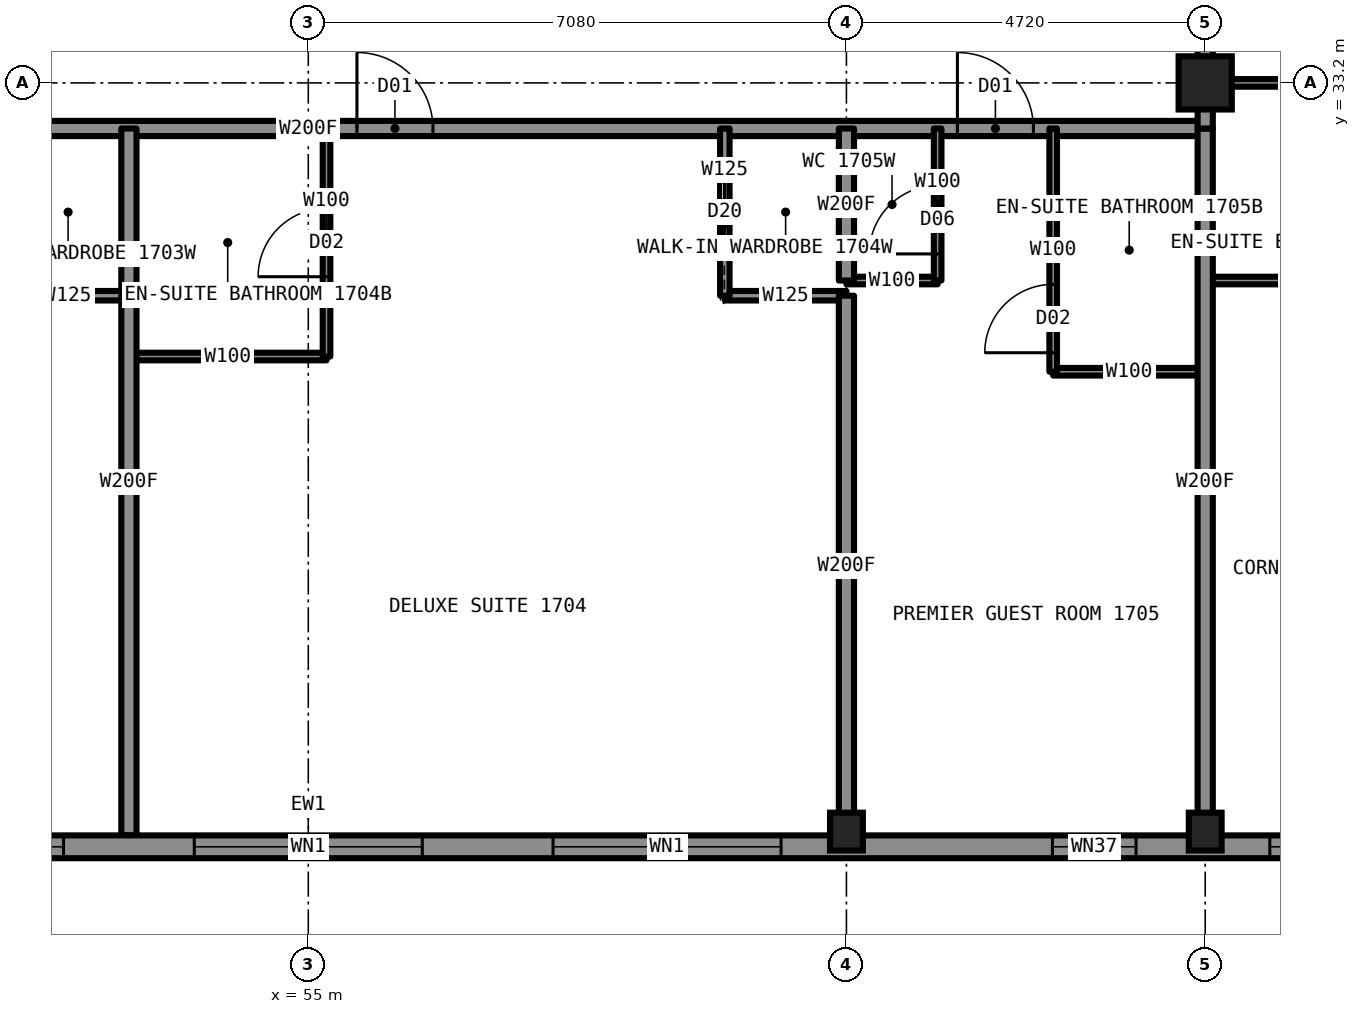
"""IFC4 building model, lengths in metres.
Left out: names, types, materials, properties, quantities, classifications, styles, units other than length and angle.
Written with IfcOpenShell. Run it as: python <this file> out.ifc"""

import sys

from ifc_helpers import new_model, si_unit, direction, frame, frame_2d, origin, origin_2d, place, context, subcontext, project, spatial, rectangle, hollow_rectangle, i_section, extrude, element, fill, save


model = new_model("IFC4")
c1 = context("Model", 3, precision=1e-05, world=origin(), true_north=direction((0.0, 1.0)))
c2 = subcontext(c1, "Body", "Model", "MODEL_VIEW")
j1 = project(units=[si_unit("LENGTHUNIT", "METRE"), si_unit("PLANEANGLEUNIT", "RADIAN")], contexts=[c1])
p1 = place(None, origin())
s1 = spatial("IfcSite", under=j1, at=p1, CompositionType="ELEMENT")
p2 = place(p1, origin())
s2 = spatial("IfcBuilding", under=s1, at=p2, CompositionType="ELEMENT")
p3 = place(p2, frame((0.0, 0.0, 60.0)))
s3 = spatial("IfcBuildingStorey", under=s2, at=p3, CompositionType="ELEMENT", Elevation=60.0)
for number, where, z_axis, x_axis in (
    (1, (62.08, 23.35, 0.0), (0.0, 0.0, 1.0), (1.0, 0.0, 0.0)),
    (2, (66.8, 23.35, 0.0), (0.0, 0.0, 1.0), (1.0, 0.0, 0.0)),
):
    element("IfcColumn", number, at=place(p3, frame(where, z_axis=z_axis, x_axis=x_axis)), inside=s3, PredefinedType="COLUMN", context=c2, shape_type="SweptSolid", body=[
        extrude(i_section(OverallWidth=0.432, OverallDepth=0.498, WebThickness=0.056, FlangeThickness=0.089, at=origin_2d()), origin(), (0.0, 0.0, 1.0), 3.5),
    ])
p4 = place(p3, frame((66.8, 33.2, 0.0), z_axis=(0.0, 0.0, 1.0), x_axis=(1.0, 0.0, 0.0)))
e3 = element("IfcColumn", 3, at=p4, inside=s3, PredefinedType="COLUMN", context=c2, shape_type="SweptSolid", body=[
    extrude(hollow_rectangle(XDim=0.7, YDim=0.7, WallThickness=0.06, at=origin_2d()), origin(), (0.0, 0.0, 1.0), 3.5),
])
p5 = place(p3, frame((66.8, 33.2, 0.0), z_axis=(0.0, 0.0, 1.0), x_axis=(1.0, 0.0, 0.0)))
e4 = element("IfcWall", 4, at=p5, inside=s3, PredefinedType="PARTITIONING", context=c2, shape_type="SweptSolid", body=[
    extrude(rectangle(XDim=2.6, YDim=0.1, at=frame_2d((1.3, 0.0))), origin(), (0.0, 0.0, 1.0), 2.573),
])
p6 = place(p3, frame((43.2, 32.6, 0.0), z_axis=(0.0, 0.0, 1.0), x_axis=(1.0, 0.0, 0.0)))
e5 = element("IfcWall", 5, at=p6, inside=s3, PredefinedType="PARTITIONING", context=c2, shape_type="SweptSolid", body=[
    extrude(rectangle(XDim=23.6, YDim=0.2, at=frame_2d((11.8, 0.0))), origin(), (0.0, 0.0, 1.0), 3.33),
])
p7 = place(p6, frame((3.0, 0.0, 0.0)))
e6 = element("IfcOpeningElement", 6, at=p7, cuts=e5, PredefinedType="OPENING", context=c2, shape_type="SweptSolid", body=[
    extrude(rectangle(XDim=1.0, YDim=2.2, at=frame_2d((0.5, 1.1))), frame((0.0, 0.11, 0.0), z_axis=(0.0, -1.0, 0.0), x_axis=(1.0, 0.0, 0.0)), (0.0, 0.0, 1.0), 0.22),
])
p8 = place(p6, frame((12.44, 0.0, 0.0)))
e7 = element("IfcOpeningElement", 7, at=p8, cuts=e5, PredefinedType="OPENING", context=c2, shape_type="SweptSolid", body=[
    extrude(rectangle(XDim=1.0, YDim=2.2, at=frame_2d((0.5, 1.1))), frame((0.0, 0.11, 0.0), z_axis=(0.0, -1.0, 0.0), x_axis=(1.0, 0.0, 0.0)), (0.0, 0.0, 1.0), 0.22),
])
p9 = place(p6, frame((20.34, 0.0, 0.0)))
e8 = element("IfcOpeningElement", 8, at=p9, cuts=e5, PredefinedType="OPENING", context=c2, shape_type="SweptSolid", body=[
    extrude(rectangle(XDim=1.0, YDim=2.2, at=frame_2d((0.5, 1.1))), frame((0.0, 0.11, 0.0), z_axis=(0.0, -1.0, 0.0), x_axis=(1.0, 0.0, 0.0)), (0.0, 0.0, 1.0), 0.22),
])
p10 = place(p3, frame((62.08, 30.6, 0.0), z_axis=(0.0, 0.0, 1.0), x_axis=(1.0, 0.0, 0.0)))
e9 = element("IfcWall", 9, at=p10, inside=s3, PredefinedType="PARTITIONING", context=c2, shape_type="SweptSolid", body=[
    extrude(rectangle(XDim=1.2, YDim=0.1, at=frame_2d((0.6, 0.0))), origin(), (0.0, 0.0, 1.0), 3.33),
])
p11 = place(p3, frame((66.8, 30.6, 0.0), z_axis=(0.0, 0.0, 1.0), x_axis=(1.0, 0.0, 0.0)))
e10 = element("IfcWall", 10, at=p11, inside=s3, PredefinedType="PARTITIONING", context=c2, shape_type="SweptSolid", body=[
    extrude(rectangle(XDim=2.6, YDim=0.1, at=frame_2d((1.3, 0.0))), origin(), (0.0, 0.0, 1.0), 3.33),
])
p12 = place(p3, frame((51.04, 30.4, 0.0), z_axis=(0.0, 0.0, 1.0), x_axis=(1.0, 0.0, 0.0)))
e11 = element("IfcWall", 11, at=p12, inside=s3, PredefinedType="PARTITIONING", context=c2, shape_type="SweptSolid", body=[
    extrude(rectangle(XDim=1.6, YDim=0.125, at=frame_2d((0.8, 0.0))), origin(), (0.0, 0.0, 1.0), 3.33),
])
p13 = place(p3, frame((60.48, 30.4, 0.0), z_axis=(0.0, 0.0, 1.0), x_axis=(1.0, 0.0, 0.0)))
e12 = element("IfcWall", 12, at=p13, inside=s3, PredefinedType="PARTITIONING", context=c2, shape_type="SweptSolid", body=[
    extrude(rectangle(XDim=1.6, YDim=0.125, at=frame_2d((0.8, 0.0))), origin(), (0.0, 0.0, 1.0), 3.33),
])
p14 = place(p3, frame((52.64, 29.6, 0.0), z_axis=(0.0, 0.0, 1.0), x_axis=(1.0, 0.0, 0.0)))
e13 = element("IfcWall", 13, at=p14, inside=s3, PredefinedType="PARTITIONING", context=c2, shape_type="SweptSolid", body=[
    extrude(rectangle(XDim=2.6, YDim=0.1, at=frame_2d((1.3, 0.0))), origin(), (0.0, 0.0, 1.0), 3.33),
])
p15 = place(p3, frame((64.8, 29.4, 0.0), z_axis=(0.0, 0.0, 1.0), x_axis=(1.0, 0.0, 0.0)))
e14 = element("IfcWall", 14, at=p15, inside=s3, PredefinedType="PARTITIONING", context=c2, shape_type="SweptSolid", body=[
    extrude(rectangle(XDim=2.0, YDim=0.1, at=frame_2d((1.0, 0.0))), origin(), (0.0, 0.0, 1.0), 3.33),
])
p16 = place(p3, frame((52.64, 23.3, 0.0), z_axis=(0.0, 0.0, 1.0), x_axis=(0.0, 1.0, 0.0)))
e15 = element("IfcWall", 15, at=p16, inside=s3, PredefinedType="PARTITIONING", context=c2, shape_type="SweptSolid", body=[
    extrude(rectangle(XDim=9.3, YDim=0.2, at=frame_2d((4.65, 0.0))), origin(), (0.0, 0.0, 1.0), 3.33),
])
p17 = place(p3, frame((55.24, 29.6, 0.0), z_axis=(0.0, 0.0, 1.0), x_axis=(0.0, 1.0, 0.0)))
e16 = element("IfcWall", 16, at=p17, inside=s3, PredefinedType="PARTITIONING", context=c2, shape_type="SweptSolid", body=[
    extrude(rectangle(XDim=3.0, YDim=0.1, at=frame_2d((1.5, 0.0))), origin(), (0.0, 0.0, 1.0), 3.33),
])
p18 = place(p17, frame((1.05, 0.0, 0.0)))
e17 = element("IfcOpeningElement", 17, at=p18, cuts=e16, PredefinedType="OPENING", context=c2, shape_type="SweptSolid", body=[
    extrude(rectangle(XDim=0.9, YDim=2.1, at=frame_2d((0.45, 1.05))), frame((0.0, 0.06, 0.0), z_axis=(0.0, -1.0, 0.0), x_axis=(1.0, 0.0, 0.0)), (0.0, 0.0, 1.0), 0.12),
])
p19 = place(p3, frame((66.8, 33.22, 0.0), z_axis=(0.0, 0.0, 1.0), x_axis=(0.0, 1.0, 0.0)))
e18 = element("IfcWall", 18, at=p19, inside=s3, PredefinedType="PARTITIONING", context=c2, shape_type="SweptSolid", body=[
    extrude(rectangle(XDim=23.58, YDim=0.2, at=frame_2d((11.79, 0.0))), origin(), (0.0, 0.0, 1.0), 3.33),
])
p20 = place(p19, frame((7.7, 0.0, 0.0)))
e19 = element("IfcOpeningElement", 19, at=p20, cuts=e18, PredefinedType="OPENING", context=c2, shape_type="SweptSolid", body=[
    extrude(rectangle(XDim=1.0, YDim=2.2, at=frame_2d((0.5, 1.1))), frame((0.0, 0.11, 0.0), z_axis=(0.0, -1.0, 0.0), x_axis=(1.0, 0.0, 0.0)), (0.0, 0.0, 1.0), 0.22),
])
p21 = place(p19, frame((17.29, 0.0, 0.0)))
e20 = element("IfcOpeningElement", 20, at=p21, cuts=e18, PredefinedType="OPENING", context=c2, shape_type="SweptSolid", body=[
    extrude(rectangle(XDim=1.0, YDim=2.2, at=frame_2d((0.5, 1.1))), frame((0.0, 0.11, 0.0), z_axis=(0.0, -1.0, 0.0), x_axis=(1.0, 0.0, 0.0)), (0.0, 0.0, 1.0), 0.22),
])
p22 = place(p19, frame((21.83, 0.0, 0.0)))
e21 = element("IfcOpeningElement", 21, at=p22, cuts=e18, PredefinedType="OPENING", context=c2, shape_type="SweptSolid", body=[
    extrude(rectangle(XDim=1.1, YDim=2.2, at=frame_2d((0.55, 1.1))), frame((0.0, 0.11, 0.0), z_axis=(0.0, -1.0, 0.0), x_axis=(1.0, 0.0, 0.0)), (0.0, 0.0, 1.0), 0.22),
])
p23 = place(p19, frame((0.63, 0.0, 0.0)))
e22 = element("IfcOpeningElement", 22, at=p23, cuts=e18, PredefinedType="OPENING", context=c2, shape_type="SweptSolid", body=[
    extrude(rectangle(XDim=1.1, YDim=2.2, at=frame_2d((0.55, 1.1))), frame((0.0, 0.11, 0.0), z_axis=(0.0, -1.0, 0.0), x_axis=(1.0, 0.0, 0.0)), (0.0, 0.0, 1.0), 0.22),
])
p24 = place(p3, frame((66.8, 23.3, 0.0), z_axis=(0.0, 0.0, 1.0), x_axis=(0.0, 1.0, 0.0)))
e23 = element("IfcWall", 23, at=p24, inside=s3, PredefinedType="PARTITIONING", context=c2, shape_type="SweptSolid", body=[
    extrude(rectangle(XDim=9.3, YDim=0.2, at=frame_2d((4.65, 0.0))), origin(), (0.0, 0.0, 1.0), 2.573),
])
p25 = place(p3, frame((60.48, 30.4, 0.0), z_axis=(0.0, 0.0, 1.0), x_axis=(0.0, 1.0, 0.0)))
e24 = element("IfcWall", 24, at=p25, inside=s3, PredefinedType="PARTITIONING", context=c2, shape_type="SweptSolid", body=[
    extrude(rectangle(XDim=2.2, YDim=0.125, at=frame_2d((1.1, 0.0))), origin(), (0.0, 0.0, 1.0), 3.33),
])
p26 = place(p25, frame((0.7, 0.0, 0.0)))
e25 = element("IfcOpeningElement", 25, at=p26, cuts=e24, PredefinedType="OPENING", context=c2, shape_type="SweptSolid", body=[
    extrude(rectangle(XDim=0.8, YDim=2.1, at=frame_2d((0.4, 1.05))), frame((0.0, 0.073, 0.0), z_axis=(0.0, -1.0, 0.0), x_axis=(1.0, 0.0, 0.0)), (0.0, 0.0, 1.0), 0.145),
])
p27 = place(p3, frame((62.08, 23.3, 0.0), z_axis=(0.0, 0.0, 1.0), x_axis=(0.0, 1.0, 0.0)))
e26 = element("IfcWall", 26, at=p27, inside=s3, PredefinedType="PARTITIONING", context=c2, shape_type="SweptSolid", body=[
    extrude(rectangle(XDim=7.1, YDim=0.2, at=frame_2d((3.55, 0.0))), origin(), (0.0, 0.0, 1.0), 2.573),
])
p28 = place(p3, frame((62.08, 30.6, 0.0), z_axis=(0.0, 0.0, 1.0), x_axis=(0.0, 1.0, 0.0)))
e27 = element("IfcWall", 27, at=p28, inside=s3, PredefinedType="PARTITIONING", context=c2, shape_type="SweptSolid", body=[
    extrude(rectangle(XDim=2.0, YDim=0.2, at=frame_2d((1.0, 0.0))), origin(), (0.0, 0.0, 1.0), 2.573),
])
p29 = place(p3, frame((63.28, 30.6, 0.0), z_axis=(0.0, 0.0, 1.0), x_axis=(0.0, 1.0, 0.0)))
e28 = element("IfcWall", 28, at=p29, inside=s3, PredefinedType="PARTITIONING", context=c2, shape_type="SweptSolid", body=[
    extrude(rectangle(XDim=2.0, YDim=0.1, at=frame_2d((1.0, 0.0))), origin(), (0.0, 0.0, 1.0), 3.33),
])
p30 = place(p29, frame((0.35, 0.0, 0.0)))
e29 = element("IfcOpeningElement", 29, at=p30, cuts=e28, PredefinedType="OPENING", context=c2, shape_type="SweptSolid", body=[
    extrude(rectangle(XDim=0.9, YDim=2.1, at=frame_2d((0.45, 1.05))), frame((0.0, 0.06, 0.0), z_axis=(0.0, -1.0, 0.0), x_axis=(1.0, 0.0, 0.0)), (0.0, 0.0, 1.0), 0.12),
])
p31 = place(p3, frame((64.8, 29.4, 0.0), z_axis=(0.0, 0.0, 1.0), x_axis=(0.0, 1.0, 0.0)))
e30 = element("IfcWall", 30, at=p31, inside=s3, PredefinedType="PARTITIONING", context=c2, shape_type="SweptSolid", body=[
    extrude(rectangle(XDim=3.2, YDim=0.1, at=frame_2d((1.6, 0.0))), origin(), (0.0, 0.0, 1.0), 3.33),
])
p32 = place(p31, frame((0.25, 0.0, 0.0)))
e31 = element("IfcOpeningElement", 31, at=p32, cuts=e30, PredefinedType="OPENING", context=c2, shape_type="SweptSolid", body=[
    extrude(rectangle(XDim=0.9, YDim=2.1, at=frame_2d((0.45, 1.05))), frame((0.0, 0.06, 0.0), z_axis=(0.0, -1.0, 0.0), x_axis=(1.0, 0.0, 0.0)), (0.0, 0.0, 1.0), 0.12),
])
p33 = place(p3, frame((38.5, 23.15, 0.0), z_axis=(0.0, 0.0, 1.0), x_axis=(1.0, 0.0, 0.0)))
e32 = element("IfcWall", 32, at=p33, inside=s3, PredefinedType="SOLIDWALL", context=c2, shape_type="SweptSolid", body=[
    extrude(rectangle(XDim=33.0, YDim=0.3, at=frame_2d((16.5, 0.0))), origin(), (0.0, 0.0, 1.0), 2.83),
])
p34 = place(p33, frame((0.85, 0.0, 0.5)))
e33 = element("IfcOpeningElement", 33, at=p34, cuts=e32, PredefinedType="OPENING", context=c2, shape_type="SweptSolid", body=[
    extrude(rectangle(XDim=3.0, YDim=2.0, at=frame_2d((1.5, 1.0))), frame((0.0, 0.16, 0.0), z_axis=(0.0, -1.0, 0.0), x_axis=(1.0, 0.0, 0.0)), (0.0, 0.0, 1.0), 0.32),
])
p35 = place(p33, frame((5.56, 0.0, 0.5)))
e34 = element("IfcOpeningElement", 34, at=p35, cuts=e32, PredefinedType="OPENING", context=c2, shape_type="SweptSolid", body=[
    extrude(rectangle(XDim=3.0, YDim=2.0, at=frame_2d((1.5, 1.0))), frame((0.0, 0.16, 0.0), z_axis=(0.0, -1.0, 0.0), x_axis=(1.0, 0.0, 0.0)), (0.0, 0.0, 1.0), 0.32),
])
p36 = place(p33, frame((10.28, 0.0, 0.5)))
e35 = element("IfcOpeningElement", 35, at=p36, cuts=e32, PredefinedType="OPENING", context=c2, shape_type="SweptSolid", body=[
    extrude(rectangle(XDim=1.2, YDim=1.7, at=frame_2d((0.6, 0.85))), frame((0.0, 0.16, 0.0), z_axis=(0.0, -1.0, 0.0), x_axis=(1.0, 0.0, 0.0)), (0.0, 0.0, 1.0), 0.32),
])
p37 = place(p33, frame((15.0, 0.0, 0.5)))
e36 = element("IfcOpeningElement", 36, at=p37, cuts=e32, PredefinedType="OPENING", context=c2, shape_type="SweptSolid", body=[
    extrude(rectangle(XDim=3.0, YDim=2.0, at=frame_2d((1.5, 1.0))), frame((0.0, 0.16, 0.0), z_axis=(0.0, -1.0, 0.0), x_axis=(1.0, 0.0, 0.0)), (0.0, 0.0, 1.0), 0.32),
])
p38 = place(p33, frame((21.52, 0.0, 0.5)))
e37 = element("IfcOpeningElement", 37, at=p38, cuts=e32, PredefinedType="OPENING", context=c2, shape_type="SweptSolid", body=[
    extrude(rectangle(XDim=1.2, YDim=1.7, at=frame_2d((0.6, 0.85))), frame((0.0, 0.16, 0.0), z_axis=(0.0, -1.0, 0.0), x_axis=(1.0, 0.0, 0.0)), (0.0, 0.0, 1.0), 0.32),
])
p39 = place(p33, frame((24.44, 0.0, 0.5)))
e38 = element("IfcOpeningElement", 38, at=p39, cuts=e32, PredefinedType="OPENING", context=c2, shape_type="SweptSolid", body=[
    extrude(rectangle(XDim=3.0, YDim=2.0, at=frame_2d((1.5, 1.0))), frame((0.0, 0.16, 0.0), z_axis=(0.0, -1.0, 0.0), x_axis=(1.0, 0.0, 0.0)), (0.0, 0.0, 1.0), 0.32),
])
p40 = place(p33, frame((29.15, 0.0, 0.5)))
e39 = element("IfcOpeningElement", 39, at=p40, cuts=e32, PredefinedType="OPENING", context=c2, shape_type="SweptSolid", body=[
    extrude(rectangle(XDim=3.0, YDim=2.0, at=frame_2d((1.5, 1.0))), frame((0.0, 0.16, 0.0), z_axis=(0.0, -1.0, 0.0), x_axis=(1.0, 0.0, 0.0)), (0.0, 0.0, 1.0), 0.32),
])
p41 = place(p33, frame((11.48, 0.0, 0.5)))
e40 = element("IfcOpeningElement", 40, at=p41, cuts=e32, PredefinedType="OPENING", context=c2, shape_type="SweptSolid", body=[
    extrude(rectangle(XDim=0.6, YDim=0.8, at=frame_2d((0.3, 0.4))), frame((0.0, 0.16, 0.0), z_axis=(0.0, -1.0, 0.0), x_axis=(1.0, 0.0, 0.0)), (0.0, 0.0, 1.0), 0.32),
])
p42 = place(p33, frame((20.87, 0.0, 0.5)))
e41 = element("IfcOpeningElement", 41, at=p42, cuts=e32, PredefinedType="OPENING", context=c2, shape_type="SweptSolid", body=[
    extrude(rectangle(XDim=0.6, YDim=0.8, at=frame_2d((0.3, 0.4))), frame((0.0, 0.16, 0.0), z_axis=(0.0, -1.0, 0.0), x_axis=(1.0, 0.0, 0.0)), (0.0, 0.0, 1.0), 0.32),
])
p43 = place(p3, frame((66.8, 32.6, 0.0), z_axis=(0.0, 0.0, 1.0), x_axis=(0.0, 1.0, 0.0)))
e42 = element("IfcWall", 42, at=p43, inside=s3, PredefinedType="PARTITIONING", context=c2, shape_type="SweptSolid", body=[
    extrude(rectangle(XDim=0.62, YDim=0.2, at=frame_2d((0.31, 0.0))), origin(), (0.0, 0.0, 1.0), 2.573),
])
p44 = place(p8, origin())
e43 = element("IfcDoor", 43, at=p44, inside=s3, OperationType="SINGLE_SWING_LEFT", PredefinedType="DOOR", context=c2, shape_type="SweptSolid", body=[
    extrude(rectangle(XDim=1.0, YDim=2.2, at=frame_2d((0.5, 1.1))), frame((0.0, 0.025, 0.0), z_axis=(0.0, -1.0, 0.0), x_axis=(1.0, 0.0, 0.0)), (0.0, 0.0, 1.0), 0.05),
])
fill(e7, e43)
p45 = place(p18, origin())
e44 = element("IfcDoor", 44, at=p45, inside=s3, OperationType="SINGLE_SWING_RIGHT", PredefinedType="DOOR", context=c2, shape_type="SweptSolid", body=[
    extrude(rectangle(XDim=0.9, YDim=2.1, at=frame_2d((0.45, 1.05))), frame((0.0, 0.025, 0.0), z_axis=(0.0, -1.0, 0.0), x_axis=(1.0, 0.0, 0.0)), (0.0, 0.0, 1.0), 0.05),
])
fill(e17, e44)
p46 = place(p26, origin())
e45 = element("IfcDoor", 45, at=p46, inside=s3, OperationType="SLIDING_TO_LEFT", PredefinedType="DOOR", context=c2, shape_type="SweptSolid", body=[
    extrude(rectangle(XDim=0.8, YDim=2.1, at=frame_2d((0.4, 1.05))), frame((0.0, 0.025, 0.0), z_axis=(0.0, -1.0, 0.0), x_axis=(1.0, 0.0, 0.0)), (0.0, 0.0, 1.0), 0.05),
])
fill(e25, e45)
p47 = place(p9, origin())
e46 = element("IfcDoor", 46, at=p47, inside=s3, OperationType="SINGLE_SWING_LEFT", PredefinedType="DOOR", context=c2, shape_type="SweptSolid", body=[
    extrude(rectangle(XDim=1.0, YDim=2.2, at=frame_2d((0.5, 1.1))), frame((0.0, 0.025, 0.0), z_axis=(0.0, -1.0, 0.0), x_axis=(1.0, 0.0, 0.0)), (0.0, 0.0, 1.0), 0.05),
])
fill(e8, e46)
p48 = place(p32, origin())
e47 = element("IfcDoor", 47, at=p48, inside=s3, OperationType="SINGLE_SWING_RIGHT", PredefinedType="DOOR", context=c2, shape_type="SweptSolid", body=[
    extrude(rectangle(XDim=0.9, YDim=2.1, at=frame_2d((0.45, 1.05))), frame((0.0, 0.025, 0.0), z_axis=(0.0, -1.0, 0.0), x_axis=(1.0, 0.0, 0.0)), (0.0, 0.0, 1.0), 0.05),
])
fill(e31, e47)
p49 = place(p30, origin())
e48 = element("IfcDoor", 48, at=p49, inside=s3, OperationType="SINGLE_SWING_LEFT", PredefinedType="DOOR", context=c2, shape_type="SweptSolid", body=[
    extrude(rectangle(XDim=0.9, YDim=2.1, at=frame_2d((0.45, 1.05))), frame((0.0, 0.025, 0.0), z_axis=(0.0, -1.0, 0.0), x_axis=(1.0, 0.0, 0.0)), (0.0, 0.0, 1.0), 0.05),
])
fill(e29, e48)
p50 = place(p37, origin())
e49 = element("IfcWindow", 49, at=p50, inside=s3, PartitioningType="SINGLE_PANEL", PredefinedType="WINDOW", context=c2, shape_type="SweptSolid", body=[
    extrude(rectangle(XDim=3.0, YDim=2.0, at=frame_2d((1.5, 1.0))), frame((0.0, 0.03, 0.0), z_axis=(0.0, -1.0, 0.0), x_axis=(1.0, 0.0, 0.0)), (0.0, 0.0, 1.0), 0.06),
])
fill(e36, e49)
p51 = place(p38, origin())
e50 = element("IfcWindow", 50, at=p51, inside=s3, PartitioningType="SINGLE_PANEL", PredefinedType="WINDOW", context=c2, shape_type="SweptSolid", body=[
    extrude(rectangle(XDim=1.2, YDim=1.7, at=frame_2d((0.6, 0.85))), frame((0.0, 0.03, 0.0), z_axis=(0.0, -1.0, 0.0), x_axis=(1.0, 0.0, 0.0)), (0.0, 0.0, 1.0), 0.06),
])
fill(e37, e50)
p52 = place(p39, origin())
e51 = element("IfcWindow", 51, at=p52, inside=s3, PartitioningType="SINGLE_PANEL", PredefinedType="WINDOW", context=c2, shape_type="SweptSolid", body=[
    extrude(rectangle(XDim=3.0, YDim=2.0, at=frame_2d((1.5, 1.0))), frame((0.0, 0.03, 0.0), z_axis=(0.0, -1.0, 0.0), x_axis=(1.0, 0.0, 0.0)), (0.0, 0.0, 1.0), 0.06),
])
fill(e38, e51)
p53 = place(p40, origin())
e52 = element("IfcWindow", 52, at=p53, inside=s3, PartitioningType="SINGLE_PANEL", PredefinedType="WINDOW", context=c2, shape_type="SweptSolid", body=[
    extrude(rectangle(XDim=3.0, YDim=2.0, at=frame_2d((1.5, 1.0))), frame((0.0, 0.03, 0.0), z_axis=(0.0, -1.0, 0.0), x_axis=(1.0, 0.0, 0.0)), (0.0, 0.0, 1.0), 0.06),
])
fill(e39, e52)
p54 = place(p42, origin())
e53 = element("IfcWindow", 53, at=p54, inside=s3, PartitioningType="SINGLE_PANEL", PredefinedType="WINDOW", context=c2, shape_type="SweptSolid", body=[
    extrude(rectangle(XDim=0.6, YDim=0.8, at=frame_2d((0.3, 0.4))), frame((0.0, 0.03, 0.0), z_axis=(0.0, -1.0, 0.0), x_axis=(1.0, 0.0, 0.0)), (0.0, 0.0, 1.0), 0.06),
])
fill(e41, e53)
save(model, sys.argv[1])
